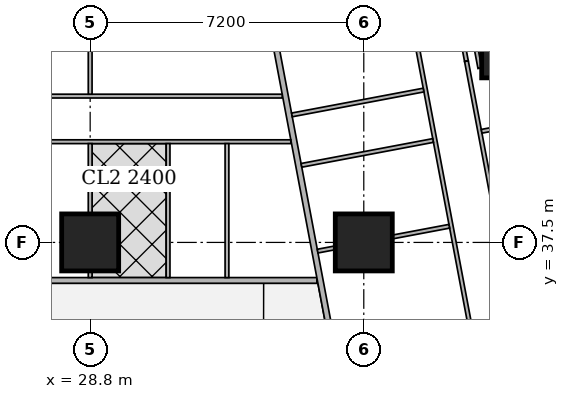
"""IFC4 building model, lengths in metres.
Left out: names, types, materials, properties, quantities, classifications, styles, units other than length and angle.
Written with IfcOpenShell. Run it as: python <this file> out.ifc"""

import sys

from ifc_helpers import new_model, si_unit, direction, frame, frame_2d, origin, origin_2d, place, context, subcontext, project, spatial, rectangle, extrude, element, fill, save


model = new_model("IFC4")
c1 = context("Model", 3, precision=1e-05, world=origin(), true_north=direction((0.0, 1.0)))
c2 = subcontext(c1, "Body", "Model", "MODEL_VIEW")
j1 = project(units=[si_unit("LENGTHUNIT", "METRE"), si_unit("PLANEANGLEUNIT", "RADIAN")], contexts=[c1])
p1 = place(None, origin())
s1 = spatial("IfcSite", under=j1, at=p1, CompositionType="ELEMENT")
p2 = place(p1, origin())
s2 = spatial("IfcBuilding", under=s1, at=p2, CompositionType="ELEMENT")
p3 = place(p2, frame((0.0, 0.0, 158.3)))
s3 = spatial("IfcBuildingStorey", under=s2, at=p3, CompositionType="ELEMENT", Elevation=158.3)
for number, where, z_axis, x_axis in (
    (1, (28.8, 37.5, 0.0), (0.0, 0.0, 1.0), (1.0, 0.0, 0.0)),
    (2, (36.0, 37.5, 0.0), (0.0, 0.0, 1.0), (1.0, 0.0, 0.0)),
):
    element("IfcColumn", number, at=place(p3, frame(where, z_axis=z_axis, x_axis=x_axis)), inside=s3, PredefinedType="COLUMN", context=c2, shape_type="SweptSolid", body=[
        extrude(rectangle(XDim=1.5, YDim=1.5, at=origin_2d()), origin(), (0.0, 0.0, 1.0), 3.75),
    ])
p4 = place(p3, frame((40.102, 42.83, 0.0), z_axis=(0.0, 0.0, 1.0), x_axis=(1.0, 0.0, 0.0)))
e3 = element("IfcColumn", 3, at=p4, inside=s3, PredefinedType="COLUMN", context=c2, shape_type="SweptSolid", body=[
    extrude(rectangle(XDim=2.0, YDim=2.0, at=origin_2d()), origin(), (0.0, 0.0, 1.0), 3.75),
])
p5 = place(p3, frame((8.35, 36.5, 0.0), z_axis=(0.0, 0.0, 1.0), x_axis=(1.0, 0.0, 0.0)))
e4 = element("IfcWall", 4, at=p5, inside=s3, PredefinedType="SOLIDWALL", context=c2, shape_type="SweptSolid", body=[
    extrude(rectangle(XDim=26.415, YDim=0.15, at=frame_2d((13.208, 0.0))), origin(), (0.0, 0.0, 1.0), 3.5),
])
p6 = place(p5, frame((2.6, 0.0, 0.0)))
e5 = element("IfcOpeningElement", 5, at=p6, cuts=e4, PredefinedType="OPENING", context=c2, shape_type="SweptSolid", body=[
    extrude(rectangle(XDim=1.0, YDim=2.1, at=frame_2d((0.5, 1.05))), frame((0.0, 0.085, 0.0), z_axis=(0.0, -1.0, 0.0), x_axis=(1.0, 0.0, 0.0)), (0.0, 0.0, 1.0), 0.17),
])
p7 = place(p5, frame((10.949, 0.0, 0.0)))
e6 = element("IfcOpeningElement", 6, at=p7, cuts=e4, PredefinedType="OPENING", context=c2, shape_type="SweptSolid", body=[
    extrude(rectangle(XDim=1.0, YDim=2.1, at=frame_2d((0.5, 1.05))), frame((0.0, 0.085, 0.0), z_axis=(0.0, -1.0, 0.0), x_axis=(1.0, 0.0, 0.0)), (0.0, 0.0, 1.0), 0.17),
])
p8 = place(p3, frame((33.623, 43.022, 0.0), z_axis=(0.0, 0.0, 1.0), x_axis=(0.185596841028, -0.98262597798, 0.0)))
e7 = element("IfcWall", 7, at=p8, inside=s3, PredefinedType="SOLIDWALL", context=c2, shape_type="SweptSolid", body=[
    extrude(rectangle(XDim=41.66, YDim=0.15, at=frame_2d((20.83, 0.0))), origin(), (0.0, 0.0, 1.0), 2.5),
])
p9 = place(p8, frame((21.514, 0.0, 0.0)))
e8 = element("IfcOpeningElement", 8, at=p9, cuts=e7, PredefinedType="OPENING", context=c2, shape_type="SweptSolid", body=[
    extrude(rectangle(XDim=1.0, YDim=2.1, at=frame_2d((0.5, 1.05))), frame((0.0, 0.085, 0.0), z_axis=(0.0, -1.0, 0.0), x_axis=(1.0, 0.0, 0.0)), (0.0, 0.0, 1.0), 0.17),
])
p10 = place(p8, frame((27.062, 0.0, 0.0)))
e9 = element("IfcOpeningElement", 9, at=p10, cuts=e7, PredefinedType="OPENING", context=c2, shape_type="SweptSolid", body=[
    extrude(rectangle(XDim=1.0, YDim=2.1, at=frame_2d((0.5, 1.05))), frame((0.0, 0.085, 0.0), z_axis=(0.0, -1.0, 0.0), x_axis=(1.0, 0.0, 0.0)), (0.0, 0.0, 1.0), 0.17),
])
p11 = place(p8, frame((29.934, 0.0, 0.0)))
e10 = element("IfcOpeningElement", 10, at=p11, cuts=e7, PredefinedType="OPENING", context=c2, shape_type="SweptSolid", body=[
    extrude(rectangle(XDim=1.0, YDim=2.1, at=frame_2d((0.5, 1.05))), frame((0.0, 0.085, 0.0), z_axis=(0.0, -1.0, 0.0), x_axis=(1.0, 0.0, 0.0)), (0.0, 0.0, 1.0), 0.17),
])
p12 = place(p3, frame((39.054, 42.085, 0.0), z_axis=(0.0, 0.0, 1.0), x_axis=(-0.185791584218, 0.982589175207, 0.0)))
e11 = element("IfcWall", 11, at=p12, inside=s3, PredefinedType="PARTITIONING", context=c2, shape_type="SweptSolid", body=[
    extrude(rectangle(XDim=3.628, YDim=0.1, at=frame_2d((1.814, 0.0))), origin(), (0.0, 0.0, 1.0), 2.1),
])
p13 = place(p3, frame((38.318, 44.298, 0.0), z_axis=(0.0, 0.0, 1.0), x_axis=(0.185481135188, -0.982647825261, 0.0)))
e12 = element("IfcWall", 12, at=p13, inside=s3, PredefinedType="PARTITIONING", context=c2, shape_type="SweptSolid", body=[
    extrude(rectangle(XDim=2.064, YDim=0.1, at=frame_2d((1.032, 0.0))), origin(), (0.0, 0.0, 1.0), 2.1),
])
p14 = place(p3, frame((38.701, 42.27, 0.0), z_axis=(0.0, 0.0, 1.0), x_axis=(0.185644634212, -0.982616949675, 0.0)))
e13 = element("IfcWall", 13, at=p14, inside=s3, PredefinedType="PARTITIONING", context=c2, shape_type="SweptSolid", body=[
    extrude(rectangle(XDim=17.227, YDim=0.1, at=frame_2d((8.613, 0.0))), origin(), (0.0, 0.0, 1.0), 2.5),
])
p15 = place(p14, frame((16.054, 0.0, 0.0)))
e14 = element("IfcOpeningElement", 14, at=p15, cuts=e13, PredefinedType="OPENING", context=c2, shape_type="SweptSolid", body=[
    extrude(rectangle(XDim=0.9, YDim=2.1, at=frame_2d((0.45, 1.05))), frame((0.0, 0.06, 0.0), z_axis=(0.0, -1.0, 0.0), x_axis=(1.0, 0.0, 0.0)), (0.0, 0.0, 1.0), 0.12),
])
p16 = place(p14, frame((12.077, 0.0, 0.0)))
e15 = element("IfcOpeningElement", 15, at=p16, cuts=e13, PredefinedType="OPENING", context=c2, shape_type="SweptSolid", body=[
    extrude(rectangle(XDim=0.9, YDim=2.1, at=frame_2d((0.45, 1.05))), frame((0.0, 0.06, 0.0), z_axis=(0.0, -1.0, 0.0), x_axis=(1.0, 0.0, 0.0)), (0.0, 0.0, 1.0), 0.12),
])
p17 = place(p14, frame((8.42, 0.0, 0.0)))
e16 = element("IfcOpeningElement", 16, at=p17, cuts=e13, PredefinedType="OPENING", context=c2, shape_type="SweptSolid", body=[
    extrude(rectangle(XDim=0.9, YDim=2.1, at=frame_2d((0.45, 1.05))), frame((0.0, 0.06, 0.0), z_axis=(0.0, -1.0, 0.0), x_axis=(1.0, 0.0, 0.0)), (0.0, 0.0, 1.0), 0.12),
])
p18 = place(p14, frame((4.444, 0.0, 0.0)))
e17 = element("IfcOpeningElement", 17, at=p18, cuts=e13, PredefinedType="OPENING", context=c2, shape_type="SweptSolid", body=[
    extrude(rectangle(XDim=0.9, YDim=2.1, at=frame_2d((0.45, 1.05))), frame((0.0, 0.06, 0.0), z_axis=(0.0, -1.0, 0.0), x_axis=(1.0, 0.0, 0.0)), (0.0, 0.0, 1.0), 0.12),
])
p19 = place(p3, frame((37.411, 42.638, 0.0), z_axis=(0.0, 0.0, 1.0), x_axis=(0.185554598549, -0.982633955732, 0.0)))
e18 = element("IfcWall", 18, at=p19, inside=s3, PredefinedType="PARTITIONING", context=c2, shape_type="SweptSolid", body=[
    extrude(rectangle(XDim=18.976, YDim=0.1, at=frame_2d((9.488, 0.0))), origin(), (0.0, 0.0, 1.0), 2.5),
])
p20 = place(p19, frame((17.551, 0.0, 0.0)))
e19 = element("IfcOpeningElement", 19, at=p20, cuts=e18, PredefinedType="OPENING", context=c2, shape_type="SweptSolid", body=[
    extrude(rectangle(XDim=0.9, YDim=2.1, at=frame_2d((0.45, 1.05))), frame((0.0, 0.06, 0.0), z_axis=(0.0, -1.0, 0.0), x_axis=(1.0, 0.0, 0.0)), (0.0, 0.0, 1.0), 0.12),
])
p21 = place(p19, frame((13.959, 0.0, 0.0)))
e20 = element("IfcOpeningElement", 20, at=p21, cuts=e18, PredefinedType="OPENING", context=c2, shape_type="SweptSolid", body=[
    extrude(rectangle(XDim=0.9, YDim=2.1, at=frame_2d((0.45, 1.05))), frame((0.0, 0.06, 0.0), z_axis=(0.0, -1.0, 0.0), x_axis=(1.0, 0.0, 0.0)), (0.0, 0.0, 1.0), 0.12),
])
p22 = place(p19, frame((10.092, 0.0, 0.0)))
e21 = element("IfcOpeningElement", 21, at=p22, cuts=e18, PredefinedType="OPENING", context=c2, shape_type="SweptSolid", body=[
    extrude(rectangle(XDim=0.9, YDim=2.1, at=frame_2d((0.45, 1.05))), frame((0.0, 0.06, 0.0), z_axis=(0.0, -1.0, 0.0), x_axis=(1.0, 0.0, 0.0)), (0.0, 0.0, 1.0), 0.12),
])
p23 = place(p19, frame((5.731, 0.0, 0.0)))
e22 = element("IfcOpeningElement", 22, at=p23, cuts=e18, PredefinedType="OPENING", context=c2, shape_type="SweptSolid", body=[
    extrude(rectangle(XDim=0.9, YDim=2.1, at=frame_2d((0.45, 1.05))), frame((0.0, 0.06, 0.0), z_axis=(0.0, -1.0, 0.0), x_axis=(1.0, 0.0, 0.0)), (0.0, 0.0, 1.0), 0.12),
])
p24 = place(p19, frame((3.188, 0.0, 0.0)))
e23 = element("IfcOpeningElement", 23, at=p24, cuts=e18, PredefinedType="OPENING", context=c2, shape_type="SweptSolid", body=[
    extrude(rectangle(XDim=0.9, YDim=2.1, at=frame_2d((0.45, 1.05))), frame((0.0, 0.06, 0.0), z_axis=(0.0, -1.0, 0.0), x_axis=(1.0, 0.0, 0.0)), (0.0, 0.0, 1.0), 0.12),
])
p25 = place(p19, frame((0.15, 0.0, 0.0)))
e24 = element("IfcOpeningElement", 24, at=p25, cuts=e18, PredefinedType="OPENING", context=c2, shape_type="SweptSolid", body=[
    extrude(rectangle(XDim=0.9, YDim=2.1, at=frame_2d((0.45, 1.05))), frame((0.0, 0.06, 0.0), z_axis=(0.0, -1.0, 0.0), x_axis=(1.0, 0.0, 0.0)), (0.0, 0.0, 1.0), 0.12),
])
p26 = place(p19, frame((15.642, 0.0, 0.0)))
e25 = element("IfcOpeningElement", 25, at=p26, cuts=e18, PredefinedType="OPENING", context=c2, shape_type="SweptSolid", body=[
    extrude(rectangle(XDim=0.9, YDim=2.1, at=frame_2d((0.45, 1.05))), frame((0.0, 0.06, 0.0), z_axis=(0.0, -1.0, 0.0), x_axis=(1.0, 0.0, 0.0)), (0.0, 0.0, 1.0), 0.12),
])
p27 = place(p19, frame((12.051, 0.0, 0.0)))
e26 = element("IfcOpeningElement", 26, at=p27, cuts=e18, PredefinedType="OPENING", context=c2, shape_type="SweptSolid", body=[
    extrude(rectangle(XDim=0.9, YDim=2.1, at=frame_2d((0.45, 1.05))), frame((0.0, 0.06, 0.0), z_axis=(0.0, -1.0, 0.0), x_axis=(1.0, 0.0, 0.0)), (0.0, 0.0, 1.0), 0.12),
])
p28 = place(p19, frame((8.185, 0.0, 0.0)))
e27 = element("IfcOpeningElement", 27, at=p28, cuts=e18, PredefinedType="OPENING", context=c2, shape_type="SweptSolid", body=[
    extrude(rectangle(XDim=0.9, YDim=2.1, at=frame_2d((0.45, 1.05))), frame((0.0, 0.06, 0.0), z_axis=(0.0, -1.0, 0.0), x_axis=(1.0, 0.0, 0.0)), (0.0, 0.0, 1.0), 0.12),
])
p29 = place(p3, frame((43.277, 41.212, 0.0), z_axis=(0.0, 0.0, 1.0), x_axis=(-0.982665405803, -0.185387972203, 0.0)))
e28 = element("IfcWall", 28, at=p29, inside=s3, PredefinedType="PARTITIONING", context=c2, shape_type="SweptSolid", body=[
    extrude(rectangle(XDim=4.25, YDim=0.1, at=frame_2d((2.125, 0.0))), origin(), (0.0, 0.0, 1.0), 2.1),
])
p30 = place(p3, frame((37.824, 40.182, 0.0), z_axis=(0.0, 0.0, 1.0), x_axis=(-0.982648794755, -0.185475998897, 0.0)))
e29 = element("IfcWall", 29, at=p30, inside=s3, PredefinedType="PARTITIONING", context=c2, shape_type="SweptSolid", body=[
    extrude(rectangle(XDim=3.525, YDim=0.1, at=frame_2d((1.763, 0.0))), origin(), (0.0, 0.0, 1.0), 3.5),
])
p31 = place(p3, frame((38.25, 37.925, 0.0), z_axis=(0.0, 0.0, 1.0), x_axis=(-0.982676595259, -0.18532865167, 0.0)))
e30 = element("IfcWall", 30, at=p31, inside=s3, PredefinedType="PARTITIONING", context=c2, shape_type="SweptSolid", body=[
    extrude(rectangle(XDim=1.516, YDim=0.1, at=frame_2d((0.758, 0.0))), origin(), (0.0, 0.0, 1.0), 3.5),
])
p32 = place(p3, frame((35.24, 37.357, 0.0), z_axis=(0.0, 0.0, 1.0), x_axis=(-0.982559813104, -0.18594680334, 0.0)))
e31 = element("IfcWall", 31, at=p32, inside=s3, PredefinedType="PARTITIONING", context=c2, shape_type="SweptSolid", body=[
    extrude(rectangle(XDim=0.462, YDim=0.1, at=frame_2d((0.231, 0.0))), origin(), (0.0, 0.0, 1.0), 3.5),
])
p33 = place(p3, frame((21.6, 41.35, 0.0), z_axis=(0.0, 0.0, 1.0), x_axis=(1.0, 0.0, 0.0)))
e32 = element("IfcWall", 32, at=p33, inside=s3, PredefinedType="PARTITIONING", context=c2, shape_type="SweptSolid", body=[
    extrude(rectangle(XDim=12.253, YDim=0.1, at=frame_2d((6.126, 0.0))), origin(), (0.0, 0.0, 1.0), 3.5),
])
p34 = place(p33, frame((0.2, 0.0, 0.0)))
e33 = element("IfcOpeningElement", 33, at=p34, cuts=e32, PredefinedType="OPENING", context=c2, shape_type="SweptSolid", body=[
    extrude(rectangle(XDim=0.9, YDim=2.1, at=frame_2d((0.45, 1.05))), frame((0.0, 0.06, 0.0), z_axis=(0.0, -1.0, 0.0), x_axis=(1.0, 0.0, 0.0)), (0.0, 0.0, 1.0), 0.12),
])
p35 = place(p33, frame((3.8, 0.0, 0.0)))
e34 = element("IfcOpeningElement", 34, at=p35, cuts=e32, PredefinedType="OPENING", context=c2, shape_type="SweptSolid", body=[
    extrude(rectangle(XDim=0.9, YDim=2.1, at=frame_2d((0.45, 1.05))), frame((0.0, 0.06, 0.0), z_axis=(0.0, -1.0, 0.0), x_axis=(1.0, 0.0, 0.0)), (0.0, 0.0, 1.0), 0.12),
])
p36 = place(p33, frame((7.4, 0.0, 0.0)))
e35 = element("IfcOpeningElement", 35, at=p36, cuts=e32, PredefinedType="OPENING", context=c2, shape_type="SweptSolid", body=[
    extrude(rectangle(XDim=0.9, YDim=2.1, at=frame_2d((0.45, 1.05))), frame((0.0, 0.06, 0.0), z_axis=(0.0, -1.0, 0.0), x_axis=(1.0, 0.0, 0.0)), (0.0, 0.0, 1.0), 0.12),
])
p37 = place(p3, frame((21.6, 40.15, 0.0), z_axis=(0.0, 0.0, 1.0), x_axis=(1.0, 0.0, 0.0)))
e36 = element("IfcWall", 36, at=p37, inside=s3, PredefinedType="PARTITIONING", context=c2, shape_type="SweptSolid", body=[
    extrude(rectangle(XDim=12.48, YDim=0.1, at=frame_2d((6.24, 0.0))), origin(), (0.0, 0.0, 1.0), 3.5),
])
p38 = place(p37, frame((0.4, 0.0, 0.0)))
e37 = element("IfcOpeningElement", 37, at=p38, cuts=e36, PredefinedType="OPENING", context=c2, shape_type="SweptSolid", body=[
    extrude(rectangle(XDim=0.9, YDim=2.1, at=frame_2d((0.45, 1.05))), frame((0.0, 0.06, 0.0), z_axis=(0.0, -1.0, 0.0), x_axis=(1.0, 0.0, 0.0)), (0.0, 0.0, 1.0), 0.12),
])
p39 = place(p37, frame((5.549, 0.0, 0.0)))
e38 = element("IfcOpeningElement", 38, at=p39, cuts=e36, PredefinedType="OPENING", context=c2, shape_type="SweptSolid", body=[
    extrude(rectangle(XDim=0.9, YDim=2.1, at=frame_2d((0.45, 1.05))), frame((0.0, 0.06, 0.0), z_axis=(0.0, -1.0, 0.0), x_axis=(1.0, 0.0, 0.0)), (0.0, 0.0, 1.0), 0.12),
])
p40 = place(p37, frame((7.775, 0.0, 0.0)))
e39 = element("IfcOpeningElement", 39, at=p40, cuts=e36, PredefinedType="OPENING", context=c2, shape_type="SweptSolid", body=[
    extrude(rectangle(XDim=0.9, YDim=2.1, at=frame_2d((0.45, 1.05))), frame((0.0, 0.06, 0.0), z_axis=(0.0, -1.0, 0.0), x_axis=(1.0, 0.0, 0.0)), (0.0, 0.0, 1.0), 0.12),
])
p41 = place(p37, frame((11.43, 0.0, 0.0)))
e40 = element("IfcOpeningElement", 40, at=p41, cuts=e36, PredefinedType="OPENING", context=c2, shape_type="SweptSolid", body=[
    extrude(rectangle(XDim=0.9, YDim=2.1, at=frame_2d((0.45, 1.05))), frame((0.0, 0.06, 0.0), z_axis=(0.0, -1.0, 0.0), x_axis=(1.0, 0.0, 0.0)), (0.0, 0.0, 1.0), 0.12),
])
p42 = place(p37, frame((2.799, 0.0, 0.0)))
e41 = element("IfcOpeningElement", 41, at=p42, cuts=e36, PredefinedType="OPENING", context=c2, shape_type="SweptSolid", body=[
    extrude(rectangle(XDim=0.9, YDim=2.1, at=frame_2d((0.45, 1.05))), frame((0.0, 0.06, 0.0), z_axis=(0.0, -1.0, 0.0), x_axis=(1.0, 0.0, 0.0)), (0.0, 0.0, 1.0), 0.12),
])
p43 = place(p37, frame((9.575, 0.0, 0.0)))
e42 = element("IfcOpeningElement", 42, at=p43, cuts=e36, PredefinedType="OPENING", context=c2, shape_type="SweptSolid", body=[
    extrude(rectangle(XDim=0.9, YDim=2.1, at=frame_2d((0.45, 1.05))), frame((0.0, 0.06, 0.0), z_axis=(0.0, -1.0, 0.0), x_axis=(1.0, 0.0, 0.0)), (0.0, 0.0, 1.0), 0.12),
])
p44 = place(p3, frame((28.8, 41.4, 0.0), z_axis=(0.0, 0.0, 1.0), x_axis=(0.0, 1.0, 0.0)))
e43 = element("IfcWall", 43, at=p44, inside=s3, PredefinedType="PARTITIONING", context=c2, shape_type="SweptSolid", body=[
    extrude(rectangle(XDim=1.499, YDim=0.1, at=frame_2d((0.75, 0.0))), origin(), (0.0, 0.0, 1.0), 3.5),
])
p45 = place(p3, frame((28.8, 36.575, 0.0), z_axis=(0.0, 0.0, 1.0), x_axis=(0.0, 1.0, 0.0)))
e44 = element("IfcWall", 44, at=p45, inside=s3, PredefinedType="PARTITIONING", context=c2, shape_type="SweptSolid", body=[
    extrude(rectangle(XDim=0.174, YDim=0.1, at=frame_2d((0.087, 0.0))), origin(), (0.0, 0.0, 1.0), 3.5),
])
p46 = place(p3, frame((28.8, 38.251, 0.0), z_axis=(0.0, 0.0, 1.0), x_axis=(0.0, 1.0, 0.0)))
e45 = element("IfcWall", 45, at=p46, inside=s3, PredefinedType="PARTITIONING", context=c2, shape_type="SweptSolid", body=[
    extrude(rectangle(XDim=1.849, YDim=0.1, at=frame_2d((0.925, 0.0))), origin(), (0.0, 0.0, 1.0), 3.5),
])
for number, where, z_axis, x_axis in (
    (46, (32.4, 36.575, 0.0), (0.0, 0.0, 1.0), (0.0, 1.0, 0.0)),
    (47, (30.85, 36.575, 0.0), (0.0, 0.0, 1.0), (0.0, 1.0, 0.0)),
):
    element("IfcWall", number, at=place(p3, frame(where, z_axis=z_axis, x_axis=x_axis)), inside=s3, PredefinedType="PARTITIONING", context=c2, shape_type="SweptSolid", body=[
        extrude(rectangle(XDim=3.525, YDim=0.1, at=frame_2d((1.763, 0.0))), origin(), (0.0, 0.0, 1.0), 3.5),
    ])
p47 = place(p3, frame((37.573, 41.509, 0.0), z_axis=(0.0, 0.0, 1.0), x_axis=(-0.982638553676, -0.185530247748, 0.0)))
e48 = element("IfcWall", 48, at=p47, inside=s3, PredefinedType="PARTITIONING", context=c2, shape_type="SweptSolid", body=[
    extrude(rectangle(XDim=3.525, YDim=0.1, at=frame_2d((1.763, 0.0))), origin(), (0.0, 0.0, 1.0), 3.5),
])
p48 = place(p47, frame((1.325, 0.0, 0.0)))
e49 = element("IfcOpeningElement", 49, at=p48, cuts=e48, PredefinedType="OPENING", context=c2, shape_type="SweptSolid", body=[
    extrude(rectangle(XDim=0.9, YDim=2.1, at=frame_2d((0.45, 1.05))), frame((0.0, 0.06, 0.0), z_axis=(0.0, -1.0, 0.0), x_axis=(1.0, 0.0, 0.0)), (0.0, 0.0, 1.0), 0.12),
])
p49 = place(p23, origin())
e50 = element("IfcDoor", 50, at=p49, inside=s3, OperationType="SINGLE_SWING_RIGHT", PredefinedType="DOOR", context=c2, shape_type="SweptSolid", body=[
    extrude(rectangle(XDim=0.9, YDim=2.1, at=frame_2d((0.45, 1.05))), frame((0.0, 0.025, 0.0), z_axis=(0.0, -1.0, 0.0), x_axis=(1.0, 0.0, 0.0)), (0.0, 0.0, 1.0), 0.05),
])
fill(e22, e50)
p50 = place(p24, origin())
e51 = element("IfcDoor", 51, at=p50, inside=s3, OperationType="SINGLE_SWING_RIGHT", PredefinedType="DOOR", context=c2, shape_type="SweptSolid", body=[
    extrude(rectangle(XDim=0.9, YDim=2.1, at=frame_2d((0.45, 1.05))), frame((0.0, 0.025, 0.0), z_axis=(0.0, -1.0, 0.0), x_axis=(1.0, 0.0, 0.0)), (0.0, 0.0, 1.0), 0.05),
])
fill(e23, e51)
p51 = place(p25, origin())
e52 = element("IfcDoor", 52, at=p51, inside=s3, OperationType="SINGLE_SWING_RIGHT", PredefinedType="DOOR", context=c2, shape_type="SweptSolid", body=[
    extrude(rectangle(XDim=0.9, YDim=2.1, at=frame_2d((0.45, 1.05))), frame((0.0, 0.025, 0.0), z_axis=(0.0, -1.0, 0.0), x_axis=(1.0, 0.0, 0.0)), (0.0, 0.0, 1.0), 0.05),
])
fill(e24, e52)
p52 = place(p36, origin())
e53 = element("IfcDoor", 53, at=p52, inside=s3, OperationType="SINGLE_SWING_LEFT", PredefinedType="DOOR", context=c2, shape_type="SweptSolid", body=[
    extrude(rectangle(XDim=0.9, YDim=2.1, at=frame_2d((0.45, 1.05))), frame((0.0, 0.025, 0.0), z_axis=(0.0, -1.0, 0.0), x_axis=(1.0, 0.0, 0.0)), (0.0, 0.0, 1.0), 0.05),
])
fill(e35, e53)
p53 = place(p39, origin())
e54 = element("IfcDoor", 54, at=p53, inside=s3, OperationType="SINGLE_SWING_LEFT", PredefinedType="DOOR", context=c2, shape_type="SweptSolid", body=[
    extrude(rectangle(XDim=0.9, YDim=2.1, at=frame_2d((0.45, 1.05))), frame((0.0, 0.025, 0.0), z_axis=(0.0, -1.0, 0.0), x_axis=(1.0, 0.0, 0.0)), (0.0, 0.0, 1.0), 0.05),
])
fill(e38, e54)
p54 = place(p40, origin())
e55 = element("IfcDoor", 55, at=p54, inside=s3, OperationType="SINGLE_SWING_LEFT", PredefinedType="DOOR", context=c2, shape_type="SweptSolid", body=[
    extrude(rectangle(XDim=0.9, YDim=2.1, at=frame_2d((0.45, 1.05))), frame((0.0, 0.025, 0.0), z_axis=(0.0, -1.0, 0.0), x_axis=(1.0, 0.0, 0.0)), (0.0, 0.0, 1.0), 0.05),
])
fill(e39, e55)
p55 = place(p41, origin())
e56 = element("IfcDoor", 56, at=p55, inside=s3, OperationType="SINGLE_SWING_LEFT", PredefinedType="DOOR", context=c2, shape_type="SweptSolid", body=[
    extrude(rectangle(XDim=0.9, YDim=2.1, at=frame_2d((0.45, 1.05))), frame((0.0, 0.025, 0.0), z_axis=(0.0, -1.0, 0.0), x_axis=(1.0, 0.0, 0.0)), (0.0, 0.0, 1.0), 0.05),
])
fill(e40, e56)
p56 = place(p43, origin())
e57 = element("IfcDoor", 57, at=p56, inside=s3, OperationType="SINGLE_SWING_RIGHT", PredefinedType="DOOR", context=c2, shape_type="SweptSolid", body=[
    extrude(rectangle(XDim=0.9, YDim=2.1, at=frame_2d((0.45, 1.05))), frame((0.0, 0.025, 0.0), z_axis=(0.0, -1.0, 0.0), x_axis=(1.0, 0.0, 0.0)), (0.0, 0.0, 1.0), 0.05),
])
fill(e42, e57)
p57 = place(p48, origin())
e58 = element("IfcDoor", 58, at=p57, inside=s3, OperationType="SINGLE_SWING_LEFT", PredefinedType="DOOR", context=c2, shape_type="SweptSolid", body=[
    extrude(rectangle(XDim=0.9, YDim=2.1, at=frame_2d((0.45, 1.05))), frame((0.0, 0.025, 0.0), z_axis=(0.0, -1.0, 0.0), x_axis=(1.0, 0.0, 0.0)), (0.0, 0.0, 1.0), 0.05),
])
fill(e49, e58)
save(model, sys.argv[1])
